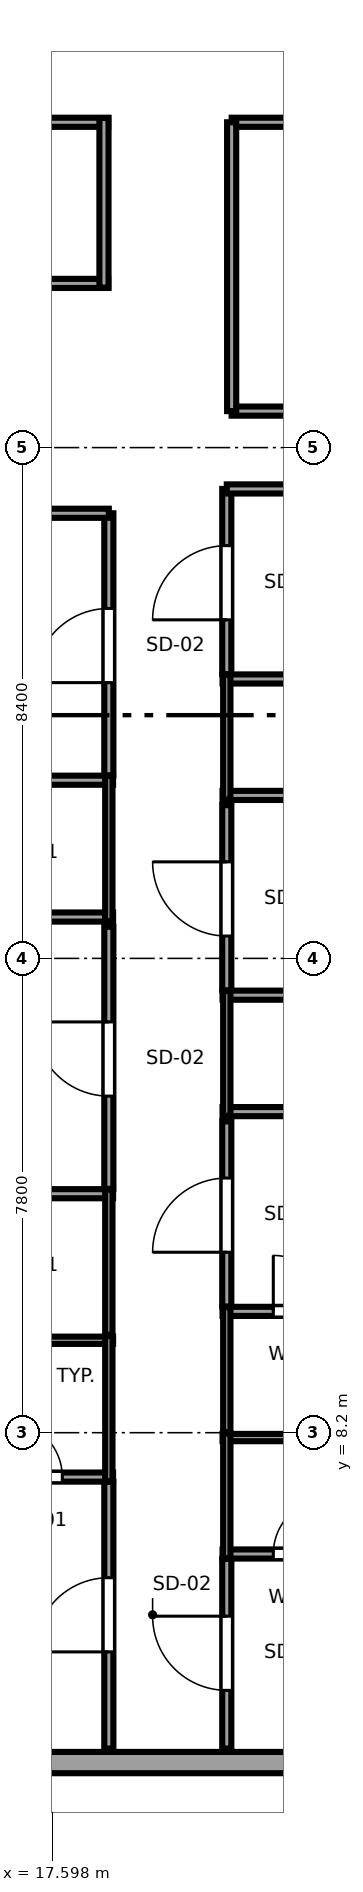
"""IFC4 building model, lengths in metres.
Left out: names, types, materials, properties, quantities, classifications, styles, units other than length and angle.
Written with IfcOpenShell. Run it as: python <this file> out.ifc"""

import sys

from ifc_helpers import new_model, si_unit, direction, frame, frame_2d, origin, place, context, subcontext, project, spatial, rectangle, extrude, source, transform, mapped, element, fill, save


model = new_model("IFC4")
c1 = context("Model", 3, precision=1e-05, world=origin(), true_north=direction((0.0, 1.0)))
c2 = subcontext(c1, "Body", "Model", "MODEL_VIEW")
j1 = project(units=[si_unit("LENGTHUNIT", "METRE"), si_unit("PLANEANGLEUNIT", "RADIAN")], contexts=[c1])
p1 = place(None, origin())
s1 = spatial("IfcSite", under=j1, at=p1, CompositionType="ELEMENT")
p2 = place(p1, origin())
s2 = spatial("IfcBuilding", under=s1, at=p2, CompositionType="ELEMENT")
p3 = place(p2, frame((0.0, 0.0, 234.55)))
s3 = spatial("IfcBuildingStorey", under=s2, at=p3, CompositionType="ELEMENT", Elevation=234.55)
p4 = place(p3, frame((7.017, 2.775, 0.0), z_axis=(0.0, 0.0, 1.0), x_axis=(1.0, 0.0, 0.0)))
e1 = element("IfcWall", 1, at=p4, inside=s3, PredefinedType="SOLIDWALL", context=c2, shape_type="SweptSolid", body=[
    extrude(rectangle(XDim=28.366, YDim=0.35, at=frame_2d((14.183, 0.0))), origin(), (0.0, 0.0, 1.0), 3.37),
])
p5 = place(p4, frame((1.514, 0.0, 0.68)))
e2 = element("IfcOpeningElement", 2, at=p5, cuts=e1, PredefinedType="OPENING", context=c2, shape_type="SweptSolid", body=[
    extrude(rectangle(XDim=2.7, YDim=1.95, at=frame_2d((1.35, 0.975))), frame((0.0, 0.185, 0.0), z_axis=(0.0, -1.0, 0.0), x_axis=(1.0, 0.0, 0.0)), (0.0, 0.0, 1.0), 0.37),
])
p6 = place(p4, frame((15.647, 0.0, 0.68)))
e3 = element("IfcOpeningElement", 3, at=p6, cuts=e1, PredefinedType="OPENING", context=c2, shape_type="SweptSolid", body=[
    extrude(rectangle(XDim=2.7, YDim=1.95, at=frame_2d((1.35, 0.975))), frame((0.0, 0.185, 0.0), z_axis=(0.0, -1.0, 0.0), x_axis=(1.0, 0.0, 0.0)), (0.0, 0.0, 1.0), 0.37),
])
p7 = place(p4, frame((24.152, 0.0, 0.68)))
e4 = element("IfcOpeningElement", 4, at=p7, cuts=e1, PredefinedType="OPENING", context=c2, shape_type="SweptSolid", body=[
    extrude(rectangle(XDim=2.7, YDim=1.95, at=frame_2d((1.35, 0.975))), frame((0.0, 0.185, 0.0), z_axis=(0.0, -1.0, 0.0), x_axis=(1.0, 0.0, 0.0)), (0.0, 0.0, 1.0), 0.37),
])
p8 = place(p3, frame((16.01, 7.47, 0.0), z_axis=(0.0, 0.0, 1.0), x_axis=(1.0, 0.0, 0.0)))
e5 = element("IfcWall", 5, at=p8, inside=s3, PredefinedType="PARTITIONING", context=c2, shape_type="SweptSolid", body=[
    extrude(rectangle(XDim=2.59, YDim=0.15, at=frame_2d((1.295, 0.0))), origin(), (0.0, 0.0, 1.0), 3.37),
])
p9 = place(p8, frame((0.835, 0.0, 0.0)))
e6 = element("IfcOpeningElement", 6, at=p9, cuts=e5, PredefinedType="OPENING", context=c2, shape_type="SweptSolid", body=[
    extrude(rectangle(XDim=0.92, YDim=2.01, at=frame_2d((0.46, 1.005))), frame((0.0, 0.085, 0.0), z_axis=(0.0, -1.0, 0.0), x_axis=(1.0, 0.0, 0.0)), (0.0, 0.0, 1.0), 0.17),
])
p10 = place(p3, frame((16.01, 9.72, 0.0), z_axis=(0.0, 0.0, 1.0), x_axis=(1.0, 0.0, 0.0)))
e7 = element("IfcWall", 7, at=p10, inside=s3, PredefinedType="PLUMBINGWALL", context=c2, shape_type="SweptSolid", body=[
    extrude(rectangle(XDim=2.59, YDim=0.12, at=frame_2d((1.295, 0.0))), origin(), (0.0, 0.0, 1.0), 3.37),
])
p11 = place(p3, frame((18.53, 7.4, 0.0), z_axis=(0.0, 0.0, 1.0), x_axis=(0.0, 1.0, 0.0)))
e8 = element("IfcWall", 8, at=p11, inside=s3, PredefinedType="PLUMBINGWALL", context=c2, shape_type="SweptSolid", body=[
    extrude(rectangle(XDim=2.39, YDim=0.12, at=frame_2d((1.195, 0.0))), origin(), (0.0, 0.0, 1.0), 3.37),
])
p12 = place(p3, frame((16.01, 12.13, 0.0), z_axis=(0.0, 0.0, 1.0), x_axis=(1.0, 0.0, 0.0)))
e9 = element("IfcWall", 9, at=p12, inside=s3, PredefinedType="PARTITIONING", context=c2, shape_type="SweptSolid", body=[
    extrude(rectangle(XDim=2.59, YDim=0.15, at=frame_2d((1.295, 0.0))), origin(), (0.0, 0.0, 1.0), 3.37),
])
p13 = place(p3, frame((18.53, 9.81, 0.0), z_axis=(0.0, 0.0, 1.0), x_axis=(0.0, 1.0, 0.0)))
e10 = element("IfcWall", 10, at=p13, inside=s3, PredefinedType="PLUMBINGWALL", context=c2, shape_type="SweptSolid", body=[
    extrude(rectangle(XDim=2.39, YDim=0.12, at=frame_2d((1.195, 0.0))), origin(), (0.0, 0.0, 1.0), 3.37),
])
p14 = place(p3, frame((3.005, 16.68, 0.0), z_axis=(0.0, 0.0, 1.0), x_axis=(1.0, 0.0, 0.0)))
e11 = element("IfcWall", 11, at=p14, inside=s3, PredefinedType="PARTITIONING", context=c2, shape_type="SweptSolid", body=[
    extrude(rectangle(XDim=15.595, YDim=0.15, at=frame_2d((7.798, 0.0))), origin(), (0.0, 0.0, 1.0), 3.37),
])
p15 = place(p3, frame((16.01, 18.93, 0.0), z_axis=(0.0, 0.0, 1.0), x_axis=(1.0, 0.0, 0.0)))
e12 = element("IfcWall", 12, at=p15, inside=s3, PredefinedType="PARTITIONING", context=c2, shape_type="SweptSolid", body=[
    extrude(rectangle(XDim=2.59, YDim=0.15, at=frame_2d((1.295, 0.0))), origin(), (0.0, 0.0, 1.0), 3.37),
])
p16 = place(p3, frame((18.53, 16.61, 0.0), z_axis=(0.0, 0.0, 1.0), x_axis=(0.0, 1.0, 0.0)))
e13 = element("IfcWall", 13, at=p16, inside=s3, PredefinedType="PLUMBINGWALL", context=c2, shape_type="SweptSolid", body=[
    extrude(rectangle(XDim=2.39, YDim=0.12, at=frame_2d((1.195, 0.0))), origin(), (0.0, 0.0, 1.0), 3.37),
])
p17 = place(p3, frame((20.4, 6.205, 0.0), z_axis=(0.0, 0.0, 1.0), x_axis=(1.0, 0.0, 0.0)))
e14 = element("IfcWall", 14, at=p17, inside=s3, PredefinedType="PARTITIONING", context=c2, shape_type="SweptSolid", body=[
    extrude(rectangle(XDim=2.59, YDim=0.15, at=frame_2d((1.295, 0.0))), origin(), (0.0, 0.0, 1.0), 3.37),
])
p18 = place(p17, frame((0.835, 0.0, 0.0)))
e15 = element("IfcOpeningElement", 15, at=p18, cuts=e14, PredefinedType="OPENING", context=c2, shape_type="SweptSolid", body=[
    extrude(rectangle(XDim=0.92, YDim=2.01, at=frame_2d((0.46, 1.005))), frame((0.0, 0.085, 0.0), z_axis=(0.0, -1.0, 0.0), x_axis=(1.0, 0.0, 0.0)), (0.0, 0.0, 1.0), 0.17),
])
p19 = place(p3, frame((20.4, 8.12, 0.0), z_axis=(0.0, 0.0, 1.0), x_axis=(1.0, 0.0, 0.0)))
e16 = element("IfcWall", 16, at=p19, inside=s3, PredefinedType="PLUMBINGWALL", context=c2, shape_type="SweptSolid", body=[
    extrude(rectangle(XDim=2.59, YDim=0.12, at=frame_2d((1.295, 0.0))), origin(), (0.0, 0.0, 1.0), 2.758),
])
p20 = place(p3, frame((20.47, 6.135, 0.0), z_axis=(0.0, 0.0, 1.0), x_axis=(0.0, 1.0, 0.0)))
e17 = element("IfcWall", 17, at=p20, inside=s3, PredefinedType="PLUMBINGWALL", context=c2, shape_type="SweptSolid", body=[
    extrude(rectangle(XDim=2.055, YDim=0.12, at=frame_2d((1.027, 0.0))), origin(), (0.0, 0.0, 1.0), 3.37),
])
p21 = place(p3, frame((20.4, 10.195, 0.0), z_axis=(0.0, 0.0, 1.0), x_axis=(1.0, 0.0, 0.0)))
e18 = element("IfcWall", 18, at=p21, inside=s3, PredefinedType="PARTITIONING", context=c2, shape_type="SweptSolid", body=[
    extrude(rectangle(XDim=2.59, YDim=0.15, at=frame_2d((1.295, 0.0))), origin(), (0.0, 0.0, 1.0), 3.37),
])
p22 = place(p21, frame((0.835, 0.0, 0.0)))
e19 = element("IfcOpeningElement", 19, at=p22, cuts=e18, PredefinedType="OPENING", context=c2, shape_type="SweptSolid", body=[
    extrude(rectangle(XDim=0.92, YDim=2.01, at=frame_2d((0.46, 1.005))), frame((0.0, 0.085, 0.0), z_axis=(0.0, -1.0, 0.0), x_axis=(1.0, 0.0, 0.0)), (0.0, 0.0, 1.0), 0.17),
])
p23 = place(p3, frame((20.47, 8.21, 0.0), z_axis=(0.0, 0.0, 1.0), x_axis=(0.0, 1.0, 0.0)))
e20 = element("IfcWall", 20, at=p23, inside=s3, PredefinedType="PLUMBINGWALL", context=c2, shape_type="SweptSolid", body=[
    extrude(rectangle(XDim=2.055, YDim=0.12, at=frame_2d((1.027, 0.0))), origin(), (0.0, 0.0, 1.0), 3.37),
])
p24 = place(p3, frame((20.4, 13.48, 0.0), z_axis=(0.0, 0.0, 1.0), x_axis=(1.0, 0.0, 0.0)))
e21 = element("IfcWall", 21, at=p24, inside=s3, PredefinedType="PARTITIONING", context=c2, shape_type="SweptSolid", body=[
    extrude(rectangle(XDim=18.995, YDim=0.15, at=frame_2d((9.498, 0.0))), origin(), (0.0, 0.0, 1.0), 3.37),
])
p25 = place(p3, frame((20.4, 15.395, 0.0), z_axis=(0.0, 0.0, 1.0), x_axis=(1.0, 0.0, 0.0)))
e22 = element("IfcWall", 22, at=p25, inside=s3, PredefinedType="PARTITIONING", context=c2, shape_type="SweptSolid", body=[
    extrude(rectangle(XDim=2.59, YDim=0.15, at=frame_2d((1.295, 0.0))), origin(), (0.0, 0.0, 1.0), 3.37),
])
p26 = place(p3, frame((20.47, 13.41, 0.0), z_axis=(0.0, 0.0, 1.0), x_axis=(0.0, 1.0, 0.0)))
e23 = element("IfcWall", 23, at=p26, inside=s3, PredefinedType="PLUMBINGWALL", context=c2, shape_type="SweptSolid", body=[
    extrude(rectangle(XDim=2.055, YDim=0.12, at=frame_2d((1.028, 0.0))), origin(), (0.0, 0.0, 1.0), 3.37),
])
p27 = place(p3, frame((20.4, 18.68, 0.0), z_axis=(0.0, 0.0, 1.0), x_axis=(1.0, 0.0, 0.0)))
e24 = element("IfcWall", 24, at=p27, inside=s3, PredefinedType="PARTITIONING", context=c2, shape_type="SweptSolid", body=[
    extrude(rectangle(XDim=18.995, YDim=0.15, at=frame_2d((9.498, 0.0))), origin(), (0.0, 0.0, 1.0), 3.37),
])
p28 = place(p3, frame((20.4, 20.595, 0.0), z_axis=(0.0, 0.0, 1.0), x_axis=(1.0, 0.0, 0.0)))
e25 = element("IfcWall", 25, at=p28, inside=s3, PredefinedType="PARTITIONING", context=c2, shape_type="SweptSolid", body=[
    extrude(rectangle(XDim=2.59, YDim=0.15, at=frame_2d((1.295, 0.0))), origin(), (0.0, 0.0, 1.0), 3.37),
])
p29 = place(p3, frame((20.47, 18.61, 0.0), z_axis=(0.0, 0.0, 1.0), x_axis=(0.0, 1.0, 0.0)))
e26 = element("IfcWall", 26, at=p29, inside=s3, PredefinedType="PLUMBINGWALL", context=c2, shape_type="SweptSolid", body=[
    extrude(rectangle(XDim=2.055, YDim=0.12, at=frame_2d((1.027, 0.0))), origin(), (0.0, 0.0, 1.0), 3.37),
])
p30 = place(p3, frame((18.53, 3.005, 0.0), z_axis=(0.0, 0.0, 1.0), x_axis=(0.0, 1.0, 0.0)))
e27 = element("IfcWall", 27, at=p30, inside=s3, PredefinedType="PARTITIONING", context=c2, shape_type="SweptSolid", body=[
    extrude(rectangle(XDim=4.385, YDim=0.15, at=frame_2d((2.192, 0.0))), origin(), (0.0, 0.0, 1.0), 3.37),
])
p31 = place(p30, frame((1.59, 0.0, 0.0)))
e28 = element("IfcOpeningElement", 28, at=p31, cuts=e27, PredefinedType="OPENING", context=c2, shape_type="SweptSolid", body=[
    extrude(rectangle(XDim=1.22, YDim=2.08, at=frame_2d((0.61, 1.04))), frame((0.0, 0.085, 0.0), z_axis=(0.0, -1.0, 0.0), x_axis=(1.0, 0.0, 0.0)), (0.0, 0.0, 1.0), 0.17),
])
p32 = place(p3, frame((18.53, 12.21, 0.0), z_axis=(0.0, 0.0, 1.0), x_axis=(0.0, 1.0, 0.0)))
e29 = element("IfcWall", 29, at=p32, inside=s3, PredefinedType="PARTITIONING", context=c2, shape_type="SweptSolid", body=[
    extrude(rectangle(XDim=4.31, YDim=0.15, at=frame_2d((2.155, 0.0))), origin(), (0.0, 0.0, 1.0), 3.37),
])
p33 = place(p32, frame((1.525, 0.0, 0.0)))
e30 = element("IfcOpeningElement", 30, at=p33, cuts=e29, PredefinedType="OPENING", context=c2, shape_type="SweptSolid", body=[
    extrude(rectangle(XDim=1.22, YDim=2.08, at=frame_2d((0.61, 1.04))), frame((0.0, 0.085, 0.0), z_axis=(0.0, -1.0, 0.0), x_axis=(1.0, 0.0, 0.0)), (0.0, 0.0, 1.0), 0.17),
])
p34 = place(p3, frame((18.53, 19.01, 0.0), z_axis=(0.0, 0.0, 1.0), x_axis=(0.0, 1.0, 0.0)))
e31 = element("IfcWall", 31, at=p34, inside=s3, PredefinedType="PARTITIONING", context=c2, shape_type="SweptSolid", body=[
    extrude(rectangle(XDim=4.31, YDim=0.15, at=frame_2d((2.155, 0.0))), origin(), (0.0, 0.0, 1.0), 3.37),
])
p35 = place(p34, frame((1.525, 0.0, 0.0)))
e32 = element("IfcOpeningElement", 32, at=p35, cuts=e31, PredefinedType="OPENING", context=c2, shape_type="SweptSolid", body=[
    extrude(rectangle(XDim=1.22, YDim=2.08, at=frame_2d((0.61, 1.04))), frame((0.0, 0.085, 0.0), z_axis=(0.0, -1.0, 0.0), x_axis=(1.0, 0.0, 0.0)), (0.0, 0.0, 1.0), 0.17),
])
p36 = place(p3, frame((3.005, 23.32, 0.0), z_axis=(0.0, 0.0, 1.0), x_axis=(1.0, 0.0, 0.0)))
e33 = element("IfcWall", 33, at=p36, inside=s3, PredefinedType="PARTITIONING", context=c2, shape_type="SweptSolid", body=[
    extrude(rectangle(XDim=15.525, YDim=0.15, at=frame_2d((7.763, 0.0))), origin(), (0.0, 0.0, 1.0), 3.37),
])
p37 = place(p3, frame((20.47, 3.005, 0.0), z_axis=(0.0, 0.0, 1.0), x_axis=(0.0, 1.0, 0.0)))
e34 = element("IfcWall", 34, at=p37, inside=s3, PredefinedType="PARTITIONING", context=c2, shape_type="SweptSolid", body=[
    extrude(rectangle(XDim=3.12, YDim=0.15, at=frame_2d((1.56, 0.0))), origin(), (0.0, 0.0, 1.0), 3.37),
])
p38 = place(p37, frame((0.958, 0.0, 0.0)))
e35 = element("IfcOpeningElement", 35, at=p38, cuts=e34, PredefinedType="OPENING", context=c2, shape_type="SweptSolid", body=[
    extrude(rectangle(XDim=1.22, YDim=2.08, at=frame_2d((0.61, 1.04))), frame((0.0, 0.085, 0.0), z_axis=(0.0, -1.0, 0.0), x_axis=(1.0, 0.0, 0.0)), (0.0, 0.0, 1.0), 0.17),
])
p39 = place(p3, frame((20.47, 10.275, 0.0), z_axis=(0.0, 0.0, 1.0), x_axis=(0.0, 1.0, 0.0)))
e36 = element("IfcWall", 36, at=p39, inside=s3, PredefinedType="PARTITIONING", context=c2, shape_type="SweptSolid", body=[
    extrude(rectangle(XDim=3.045, YDim=0.15, at=frame_2d((1.522, 0.0))), origin(), (0.0, 0.0, 1.0), 3.37),
])
p40 = place(p39, frame((0.893, 0.0, 0.0)))
e37 = element("IfcOpeningElement", 37, at=p40, cuts=e36, PredefinedType="OPENING", context=c2, shape_type="SweptSolid", body=[
    extrude(rectangle(XDim=1.22, YDim=2.08, at=frame_2d((0.61, 1.04))), frame((0.0, 0.085, 0.0), z_axis=(0.0, -1.0, 0.0), x_axis=(1.0, 0.0, 0.0)), (0.0, 0.0, 1.0), 0.17),
])
p41 = place(p3, frame((20.47, 15.475, 0.0), z_axis=(0.0, 0.0, 1.0), x_axis=(0.0, 1.0, 0.0)))
e38 = element("IfcWall", 38, at=p41, inside=s3, PredefinedType="PARTITIONING", context=c2, shape_type="SweptSolid", body=[
    extrude(rectangle(XDim=3.045, YDim=0.15, at=frame_2d((1.522, 0.0))), origin(), (0.0, 0.0, 1.0), 3.37),
])
p42 = place(p41, frame((0.893, 0.0, 0.0)))
e39 = element("IfcOpeningElement", 39, at=p42, cuts=e38, PredefinedType="OPENING", context=c2, shape_type="SweptSolid", body=[
    extrude(rectangle(XDim=1.22, YDim=2.08, at=frame_2d((0.61, 1.04))), frame((0.0, 0.085, 0.0), z_axis=(0.0, -1.0, 0.0), x_axis=(1.0, 0.0, 0.0)), (0.0, 0.0, 1.0), 0.17),
])
p43 = place(p3, frame((20.47, 20.675, 0.0), z_axis=(0.0, 0.0, 1.0), x_axis=(0.0, 1.0, 0.0)))
e40 = element("IfcWall", 40, at=p43, inside=s3, PredefinedType="PARTITIONING", context=c2, shape_type="SweptSolid", body=[
    extrude(rectangle(XDim=3.045, YDim=0.15, at=frame_2d((1.522, 0.0))), origin(), (0.0, 0.0, 1.0), 3.37),
])
p44 = place(p43, frame((0.893, 0.0, 0.0)))
e41 = element("IfcOpeningElement", 41, at=p44, cuts=e40, PredefinedType="OPENING", context=c2, shape_type="SweptSolid", body=[
    extrude(rectangle(XDim=1.22, YDim=2.08, at=frame_2d((0.61, 1.04))), frame((0.0, 0.085, 0.0), z_axis=(0.0, -1.0, 0.0), x_axis=(1.0, 0.0, 0.0)), (0.0, 0.0, 1.0), 0.17),
])
p45 = place(p3, frame((20.47, 23.72, 0.0), z_axis=(0.0, 0.0, 1.0), x_axis=(1.0, 0.0, 0.0)))
e42 = element("IfcWall", 42, at=p45, inside=s3, PredefinedType="PARTITIONING", context=c2, shape_type="SweptSolid", body=[
    extrude(rectangle(XDim=18.925, YDim=0.15, at=frame_2d((9.462, 0.0))), origin(), (0.0, 0.0, 1.0), 3.37),
])
p46 = place(p3, frame((9.93, 27.1, 0.0), z_axis=(0.0, 0.0, 1.0), x_axis=(1.0, 0.0, 0.0)))
e43 = element("IfcWall", 43, at=p46, inside=s3, PredefinedType="PARTITIONING", context=c2, shape_type="SweptSolid", body=[
    extrude(rectangle(XDim=8.59, YDim=0.15, at=frame_2d((4.295, 0.0))), origin(), (0.0, 0.0, 1.0), 3.37),
])
p47 = place(p3, frame((9.93, 29.75, 0.0), z_axis=(0.0, 0.0, 1.0), x_axis=(1.0, 0.0, 0.0)))
e44 = element("IfcWall", 44, at=p47, inside=s3, PredefinedType="PARTITIONING", context=c2, shape_type="SweptSolid", body=[
    extrude(rectangle(XDim=8.59, YDim=0.15, at=frame_2d((4.295, 0.0))), origin(), (0.0, 0.0, 1.0), 3.37),
])
p48 = place(p47, frame((3.835, 0.0, 0.0)))
e45 = element("IfcOpeningElement", 45, at=p48, cuts=e44, PredefinedType="OPENING", context=c2, shape_type="SweptSolid", body=[
    extrude(rectangle(XDim=0.92, YDim=2.01, at=frame_2d((0.46, 1.005))), frame((0.0, 0.085, 0.0), z_axis=(0.0, -1.0, 0.0), x_axis=(1.0, 0.0, 0.0)), (0.0, 0.0, 1.0), 0.17),
])
p49 = place(p3, frame((18.45, 27.03, 0.0), z_axis=(0.0, 0.0, 1.0), x_axis=(0.0, 1.0, 0.0)))
e46 = element("IfcWall", 46, at=p49, inside=s3, PredefinedType="PARTITIONING", context=c2, shape_type="SweptSolid", body=[
    extrude(rectangle(XDim=2.79, YDim=0.15, at=frame_2d((1.395, 0.0))), origin(), (0.0, 0.0, 1.0), 3.37),
])
p50 = place(p3, frame((20.55, 25.0, 0.0), z_axis=(0.0, 0.0, 1.0), x_axis=(1.0, 0.0, 0.0)))
e47 = element("IfcWall", 47, at=p50, inside=s3, PredefinedType="PARTITIONING", context=c2, shape_type="SweptSolid", body=[
    extrude(rectangle(XDim=7.85, YDim=0.15, at=frame_2d((3.925, 0.0))), origin(), (0.0, 0.0, 1.0), 3.37),
])
p51 = place(p3, frame((20.55, 29.75, 0.0), z_axis=(0.0, 0.0, 1.0), x_axis=(1.0, 0.0, 0.0)))
e48 = element("IfcWall", 48, at=p51, inside=s3, PredefinedType="PARTITIONING", context=c2, shape_type="SweptSolid", body=[
    extrude(rectangle(XDim=7.85, YDim=0.15, at=frame_2d((3.925, 0.0))), origin(), (0.0, 0.0, 1.0), 3.37),
])
p52 = place(p51, frame((3.1, 0.0, 0.0)))
e49 = element("IfcOpeningElement", 49, at=p52, cuts=e48, PredefinedType="OPENING", context=c2, shape_type="SweptSolid", body=[
    extrude(rectangle(XDim=1.65, YDim=2.15, at=frame_2d((0.825, 1.075))), frame((0.0, 0.085, 0.0), z_axis=(0.0, -1.0, 0.0), x_axis=(1.0, 0.0, 0.0)), (0.0, 0.0, 1.0), 0.17),
])
p53 = place(p3, frame((20.55, 25.0, 0.0), z_axis=(0.0, 0.0, 1.0), x_axis=(0.0, 1.0, 0.0)))
e50 = element("IfcWall", 50, at=p53, inside=s3, PredefinedType="PARTITIONING", context=c2, shape_type="SweptSolid", body=[
    extrude(rectangle(XDim=4.75, YDim=0.15, at=frame_2d((2.375, 0.0))), origin(), (0.0, 0.0, 1.0), 3.37),
])
m1 = source(origin(), c2, "Body", "SweptSolid", [
    extrude(rectangle(XDim=0.92, YDim=2.01, at=frame_2d((0.46, 1.005))), frame((0.0, 0.025, 0.0), z_axis=(0.0, -1.0, 0.0), x_axis=(1.0, 0.0, 0.0)), (0.0, 0.0, 1.0), 0.05),
])
p54 = place(p9, origin())
e51 = element("IfcDoor", 51, at=p54, inside=s3, OperationType="SINGLE_SWING_LEFT", PredefinedType="DOOR", context=c2, shape_type="MappedRepresentation", body=[
    mapped(m1, transform((0.0, 0.0, 0.0), x_axis=(1.0, 0.0, 0.0), y_axis=(0.0, 1.0, 0.0), z_axis=(0.0, 0.0, 1.0), scale=1.0)),
])
fill(e6, e51)
p55 = place(p18, origin())
e52 = element("IfcDoor", 52, at=p55, inside=s3, OperationType="SINGLE_SWING_RIGHT", PredefinedType="DOOR", context=c2, shape_type="MappedRepresentation", body=[
    mapped(m1, transform((0.0, 0.0, 0.0), x_axis=(1.0, 0.0, 0.0), y_axis=(0.0, 1.0, 0.0), z_axis=(0.0, 0.0, 1.0), scale=1.0)),
])
fill(e15, e52)
p56 = place(p22, origin())
e53 = element("IfcDoor", 53, at=p56, inside=s3, OperationType="SINGLE_SWING_LEFT", PredefinedType="DOOR", context=c2, shape_type="MappedRepresentation", body=[
    mapped(m1, transform((0.0, 0.0, 0.0), x_axis=(1.0, 0.0, 0.0), y_axis=(0.0, 1.0, 0.0), z_axis=(0.0, 0.0, 1.0), scale=1.0)),
])
fill(e19, e53)
m2 = source(origin(), c2, "Body", "SweptSolid", [
    extrude(rectangle(XDim=1.22, YDim=2.08, at=frame_2d((0.61, 1.04))), frame((0.0, 0.025, 0.0), z_axis=(0.0, -1.0, 0.0), x_axis=(1.0, 0.0, 0.0)), (0.0, 0.0, 1.0), 0.05),
])
p57 = place(p31, origin())
e54 = element("IfcDoor", 54, at=p57, inside=s3, OperationType="SINGLE_SWING_LEFT", PredefinedType="DOOR", context=c2, shape_type="MappedRepresentation", body=[
    mapped(m2, transform((0.0, 0.0, 0.0), x_axis=(1.0, 0.0, 0.0), y_axis=(0.0, 1.0, 0.0), z_axis=(0.0, 0.0, 1.0), scale=1.0)),
])
fill(e28, e54)
p58 = place(p33, origin())
e55 = element("IfcDoor", 55, at=p58, inside=s3, OperationType="SINGLE_SWING_RIGHT", PredefinedType="DOOR", context=c2, shape_type="MappedRepresentation", body=[
    mapped(m2, transform((0.0, 0.0, 0.0), x_axis=(1.0, 0.0, 0.0), y_axis=(0.0, 1.0, 0.0), z_axis=(0.0, 0.0, 1.0), scale=1.0)),
])
fill(e30, e55)
p59 = place(p35, origin())
e56 = element("IfcDoor", 56, at=p59, inside=s3, OperationType="SINGLE_SWING_LEFT", PredefinedType="DOOR", context=c2, shape_type="MappedRepresentation", body=[
    mapped(m2, transform((0.0, 0.0, 0.0), x_axis=(1.0, 0.0, 0.0), y_axis=(0.0, 1.0, 0.0), z_axis=(0.0, 0.0, 1.0), scale=1.0)),
])
fill(e32, e56)
p60 = place(p38, origin())
e57 = element("IfcDoor", 57, at=p60, inside=s3, OperationType="SINGLE_SWING_RIGHT", PredefinedType="DOOR", context=c2, shape_type="MappedRepresentation", body=[
    mapped(m2, transform((0.0, 0.0, 0.0), x_axis=(1.0, 0.0, 0.0), y_axis=(0.0, 1.0, 0.0), z_axis=(0.0, 0.0, 1.0), scale=1.0)),
])
fill(e35, e57)
p61 = place(p40, origin())
e58 = element("IfcDoor", 58, at=p61, inside=s3, OperationType="SINGLE_SWING_LEFT", PredefinedType="DOOR", context=c2, shape_type="MappedRepresentation", body=[
    mapped(m2, transform((0.0, 0.0, 0.0), x_axis=(1.0, 0.0, 0.0), y_axis=(0.0, 1.0, 0.0), z_axis=(0.0, 0.0, 1.0), scale=1.0)),
])
fill(e37, e58)
p62 = place(p42, origin())
e59 = element("IfcDoor", 59, at=p62, inside=s3, OperationType="SINGLE_SWING_RIGHT", PredefinedType="DOOR", context=c2, shape_type="MappedRepresentation", body=[
    mapped(m2, transform((0.0, 0.0, 0.0), x_axis=(1.0, 0.0, 0.0), y_axis=(0.0, 1.0, 0.0), z_axis=(0.0, 0.0, 1.0), scale=1.0)),
])
fill(e39, e59)
p63 = place(p44, origin())
e60 = element("IfcDoor", 60, at=p63, inside=s3, OperationType="SINGLE_SWING_LEFT", PredefinedType="DOOR", context=c2, shape_type="MappedRepresentation", body=[
    mapped(m2, transform((0.0, 0.0, 0.0), x_axis=(1.0, 0.0, 0.0), y_axis=(0.0, 1.0, 0.0), z_axis=(0.0, 0.0, 1.0), scale=1.0)),
])
fill(e41, e60)
save(model, sys.argv[1])
